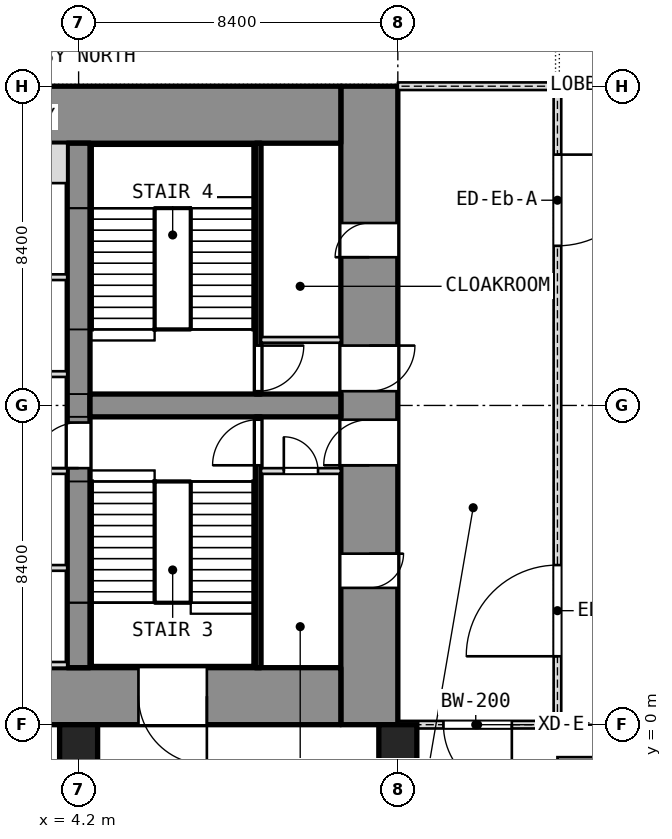
"""IFC4 building model, lengths in metres.
Left out: names, types, materials, properties, quantities, classifications, styles, units other than length and angle.
Written with IfcOpenShell. Run it as: python <this file> out.ifc"""

import sys

from ifc_helpers import new_model, si_unit, direction, frame, frame_2d, origin, origin_2d, place, context, subcontext, project, spatial, rectangle, extrude, element, fill, save


model = new_model("IFC4")
c1 = context("Model", 3, precision=1e-05, world=origin(), true_north=direction((0.0, 1.0)))
c2 = subcontext(c1, "Body", "Model", "MODEL_VIEW")
j1 = project(units=[si_unit("LENGTHUNIT", "METRE"), si_unit("PLANEANGLEUNIT", "RADIAN")], contexts=[c1])
p1 = place(None, origin())
s1 = spatial("IfcSite", under=j1, at=p1, CompositionType="ELEMENT")
p2 = place(p1, origin())
s2 = spatial("IfcBuilding", under=s1, at=p2, CompositionType="ELEMENT")
p3 = place(p2, origin())
s3 = spatial("IfcBuildingStorey", under=s2, at=p3, CompositionType="ELEMENT", Elevation=0.0)
p4 = place(p3, frame((11.85, 0.0, -0.3), z_axis=(0.0, 0.0, 1.0), x_axis=(0.0, 1.0, 0.0)))
e1 = element("IfcWall", 1, at=p4, inside=s3, PredefinedType="SHEAR", context=c2, shape_type="SweptSolid", body=[
    extrude(rectangle(XDim=16.8, YDim=1.5, at=frame_2d((8.4, 0.0))), origin(), (0.0, 0.0, 1.0), 8.3),
])
p5 = place(p4, frame((3.6, 0.0, 0.3)))
e2 = element("IfcOpeningElement", 2, at=p5, cuts=e1, PredefinedType="OPENING", context=c2, shape_type="SweptSolid", body=[
    extrude(rectangle(XDim=0.9, YDim=2.1, at=frame_2d((0.45, 1.05))), frame((0.0, 0.75, 0.0), z_axis=(0.0, -1.0, 0.0), x_axis=(1.0, 0.0, 0.0)), (0.0, 0.0, 1.0), 1.5),
])
p6 = place(p4, frame((6.825, 0.0, 0.3)))
e3 = element("IfcOpeningElement", 3, at=p6, cuts=e1, PredefinedType="OPENING", context=c2, shape_type="SweptSolid", body=[
    extrude(rectangle(XDim=1.2, YDim=2.1, at=frame_2d((0.6, 1.05))), frame((0.0, 0.75, 0.0), z_axis=(0.0, -1.0, 0.0), x_axis=(1.0, 0.0, 0.0)), (0.0, 0.0, 1.0), 1.5),
])
p7 = place(p4, frame((12.3, 0.0, 0.3)))
e4 = element("IfcOpeningElement", 4, at=p7, cuts=e1, PredefinedType="OPENING", context=c2, shape_type="SweptSolid", body=[
    extrude(rectangle(XDim=0.9, YDim=2.1, at=frame_2d((0.45, 1.05))), frame((0.0, 0.75, 0.0), z_axis=(0.0, -1.0, 0.0), x_axis=(1.0, 0.0, 0.0)), (0.0, 0.0, 1.0), 1.5),
])
p8 = place(p4, frame((8.775, 0.0, 0.3)))
e5 = element("IfcOpeningElement", 5, at=p8, cuts=e1, PredefinedType="OPENING", context=c2, shape_type="SweptSolid", body=[
    extrude(rectangle(XDim=1.2, YDim=2.1, at=frame_2d((0.6, 1.05))), frame((0.0, 0.75, 0.0), z_axis=(0.0, -1.0, 0.0), x_axis=(1.0, 0.0, 0.0)), (0.0, 0.0, 1.0), 1.5),
])
p9 = place(p3, frame((-11.1, 0.75, -0.3), z_axis=(0.0, 0.0, 1.0), x_axis=(1.0, 0.0, 0.0)))
e6 = element("IfcWall", 6, at=p9, inside=s3, PredefinedType="SHEAR", context=c2, shape_type="SweptSolid", body=[
    extrude(rectangle(XDim=22.2, YDim=1.5, at=frame_2d((11.1, 0.0))), origin(), (0.0, 0.0, 1.0), 8.3),
])
p10 = place(p9, frame((3.525, 0.0, 0.3)))
e7 = element("IfcOpeningElement", 7, at=p10, cuts=e6, PredefinedType="OPENING", context=c2, shape_type="SweptSolid", body=[
    extrude(rectangle(XDim=1.8, YDim=2.1, at=frame_2d((0.9, 1.05))), frame((0.0, 0.75, 0.0), z_axis=(0.0, -1.0, 0.0), x_axis=(1.0, 0.0, 0.0)), (0.0, 0.0, 1.0), 1.5),
])
p11 = place(p9, frame((16.875, 0.0, 0.3)))
e8 = element("IfcOpeningElement", 8, at=p11, cuts=e6, PredefinedType="OPENING", context=c2, shape_type="SweptSolid", body=[
    extrude(rectangle(XDim=1.8, YDim=2.1, at=frame_2d((0.9, 1.05))), frame((0.0, 0.75, 0.0), z_axis=(0.0, -1.0, 0.0), x_axis=(1.0, 0.0, 0.0)), (0.0, 0.0, 1.0), 1.5),
])
p12 = place(p3, frame((-11.1, 16.05, -0.3), z_axis=(0.0, 0.0, 1.0), x_axis=(1.0, 0.0, 0.0)))
e9 = element("IfcWall", 9, at=p12, inside=s3, PredefinedType="SHEAR", context=c2, shape_type="SweptSolid", body=[
    extrude(rectangle(XDim=22.2, YDim=1.5, at=frame_2d((11.1, 0.0))), origin(), (0.0, 0.0, 1.0), 8.3),
])
p13 = place(p3, frame((4.2, 1.5, -0.3), z_axis=(0.0, 0.0, 1.0), x_axis=(0.0, 1.0, 0.0)))
e10 = element("IfcWall", 10, at=p13, inside=s3, PredefinedType="SHEAR", context=c2, shape_type="SweptSolid", body=[
    extrude(rectangle(XDim=13.8, YDim=0.6, at=frame_2d((6.9, 0.0))), origin(), (0.0, 0.0, 1.0), 8.3),
])
p14 = place(p13, frame((5.25, 0.0, 0.3)))
e11 = element("IfcOpeningElement", 11, at=p14, cuts=e10, PredefinedType="OPENING", context=c2, shape_type="SweptSolid", body=[
    extrude(rectangle(XDim=1.2, YDim=2.1, at=frame_2d((0.6, 1.05))), frame((0.0, 0.3, 0.0), z_axis=(0.0, -1.0, 0.0), x_axis=(1.0, 0.0, 0.0)), (0.0, 0.0, 1.0), 0.6),
])
p15 = place(p3, frame((4.5, 8.4, -0.3), z_axis=(0.0, 0.0, 1.0), x_axis=(1.0, 0.0, 0.0)))
e12 = element("IfcWall", 12, at=p15, inside=s3, PredefinedType="SHEAR", context=c2, shape_type="SweptSolid", body=[
    extrude(rectangle(XDim=6.6, YDim=0.6, at=frame_2d((3.3, 0.0))), origin(), (0.0, 0.0, 1.0), 8.3),
])
for number, where, z_axis, x_axis in (
    (13, (4.2, -0.5, -0.3), (0.0, 0.0, 1.0), (1.0, 0.0, 0.0)),
    (14, (12.6, -0.5, -0.3), (0.0, 0.0, 1.0), (1.0, 0.0, 0.0)),
):
    element("IfcColumn", number, at=place(p3, frame(where, z_axis=z_axis, x_axis=x_axis)), inside=s3, PredefinedType="COLUMN", context=c2, shape_type="SweptSolid", body=[
        extrude(rectangle(XDim=1.0, YDim=1.0, at=origin_2d()), origin(), (0.0, 0.0, 1.0), 8.3),
    ])
p16 = place(p3, frame((8.925, 1.5, 0.0), z_axis=(0.0, 0.0, 1.0), x_axis=(0.0, 1.0, 0.0)))
e15 = element("IfcWall", 15, at=p16, inside=s3, PredefinedType="SHEAR", context=c2, shape_type="SweptSolid", body=[
    extrude(rectangle(XDim=6.6, YDim=0.15, at=frame_2d((3.3, 0.0))), origin(), (0.0, 0.0, 1.0), 7.78),
])
p17 = place(p16, frame((5.325, 0.0, 0.0)))
e16 = element("IfcOpeningElement", 16, at=p17, cuts=e15, PredefinedType="OPENING", context=c2, shape_type="SweptSolid", body=[
    extrude(rectangle(XDim=1.2, YDim=2.1, at=frame_2d((0.6, 1.05))), frame((0.0, 0.075, 0.0), z_axis=(0.0, -1.0, 0.0), x_axis=(1.0, 0.0, 0.0)), (0.0, 0.0, 1.0), 0.15),
])
p18 = place(p3, frame((9.0, 6.675, 0.0), z_axis=(0.0, 0.0, 1.0), x_axis=(1.0, 0.0, 0.0)))
e17 = element("IfcWall", 17, at=p18, inside=s3, PredefinedType="PARTITIONING", context=c2, shape_type="SweptSolid", body=[
    extrude(rectangle(XDim=2.1, YDim=0.15, at=frame_2d((1.05, 0.0))), origin(), (0.0, 0.0, 1.0), 7.78),
])
p19 = place(p18, frame((0.6, 0.0, 0.0)))
e18 = element("IfcOpeningElement", 18, at=p19, cuts=e17, PredefinedType="OPENING", context=c2, shape_type="SweptSolid", body=[
    extrude(rectangle(XDim=0.9, YDim=2.1, at=frame_2d((0.45, 1.05))), frame((0.0, 0.075, 0.0), z_axis=(0.0, -1.0, 0.0), x_axis=(1.0, 0.0, 0.0)), (0.0, 0.0, 1.0), 0.15),
])
p20 = place(p3, frame((8.925, 8.7, 0.0), z_axis=(0.0, 0.0, 1.0), x_axis=(0.0, 1.0, 0.0)))
e19 = element("IfcWall", 19, at=p20, inside=s3, PredefinedType="SHEAR", context=c2, shape_type="SweptSolid", body=[
    extrude(rectangle(XDim=6.6, YDim=0.15, at=frame_2d((3.3, 0.0))), origin(), (0.0, 0.0, 1.0), 7.78),
])
p21 = place(p20, frame((0.075, 0.0, 0.0)))
e20 = element("IfcOpeningElement", 20, at=p21, cuts=e19, PredefinedType="OPENING", context=c2, shape_type="SweptSolid", body=[
    extrude(rectangle(XDim=1.2, YDim=2.1, at=frame_2d((0.6, 1.05))), frame((0.0, 0.075, 0.0), z_axis=(0.0, -1.0, 0.0), x_axis=(1.0, 0.0, 0.0)), (0.0, 0.0, 1.0), 0.15),
])
p22 = place(p3, frame((9.0, 10.125, 0.0), z_axis=(0.0, 0.0, 1.0), x_axis=(1.0, 0.0, 0.0)))
e21 = element("IfcWall", 21, at=p22, inside=s3, PredefinedType="PARTITIONING", context=c2, shape_type="SweptSolid", body=[
    extrude(rectangle(XDim=2.1, YDim=0.15, at=frame_2d((1.05, 0.0))), origin(), (0.0, 0.0, 1.0), 7.78),
])
p23 = place(p3, frame((-3.9, 4.125, 0.0), z_axis=(0.0, 0.0, 1.0), x_axis=(1.0, 0.0, 0.0)))
e22 = element("IfcWall", 22, at=p23, inside=s3, PredefinedType="PARTITIONING", context=c2, shape_type="SweptSolid", body=[
    extrude(rectangle(XDim=7.8, YDim=0.15, at=frame_2d((3.9, 0.0))), origin(), (0.0, 0.0, 1.0), 7.78),
])
p24 = place(p23, frame((3.75, 0.0, 0.0)))
e23 = element("IfcOpeningElement", 23, at=p24, cuts=e22, PredefinedType="OPENING", context=c2, shape_type="SweptSolid", body=[
    extrude(rectangle(XDim=1.2, YDim=2.1, at=frame_2d((0.6, 1.05))), frame((0.0, 0.075, 0.0), z_axis=(0.0, -1.0, 0.0), x_axis=(1.0, 0.0, 0.0)), (0.0, 0.0, 1.0), 0.15),
])
p25 = place(p3, frame((-3.9, 11.775, 0.0), z_axis=(0.0, 0.0, 1.0), x_axis=(1.0, 0.0, 0.0)))
e24 = element("IfcWall", 24, at=p25, inside=s3, PredefinedType="PARTITIONING", context=c2, shape_type="SweptSolid", body=[
    extrude(rectangle(XDim=7.8, YDim=0.15, at=frame_2d((3.9, 0.0))), origin(), (0.0, 0.0, 1.0), 7.78),
])
p26 = place(p25, frame((3.3, 0.0, 0.0)))
e25 = element("IfcOpeningElement", 25, at=p26, cuts=e24, PredefinedType="OPENING", context=c2, shape_type="SweptSolid", body=[
    extrude(rectangle(XDim=1.2, YDim=2.1, at=frame_2d((0.6, 1.05))), frame((0.0, 0.075, 0.0), z_axis=(0.0, -1.0, 0.0), x_axis=(1.0, 0.0, 0.0)), (0.0, 0.0, 1.0), 0.15),
])
p27 = place(p3, frame((1.65, 1.575, -0.3), z_axis=(0.0, 0.0, 1.0), x_axis=(1.0, 0.0, 0.0)))
e26 = element("IfcWall", 26, at=p27, inside=s3, PredefinedType="SHEAR", context=c2, shape_type="SweptSolid", body=[
    extrude(rectangle(XDim=2.25, YDim=0.15, at=frame_2d((1.125, 0.0))), origin(), (0.0, 0.0, 1.0), 8.3),
])
p28 = place(p3, frame((1.65, 14.775, -0.3), z_axis=(0.0, 0.0, 1.0), x_axis=(1.0, 0.0, 0.0)))
e27 = element("IfcWall", 27, at=p28, inside=s3, PredefinedType="SHEAR", context=c2, shape_type="SweptSolid", body=[
    extrude(rectangle(XDim=2.25, YDim=1.05, at=frame_2d((1.125, 0.0))), origin(), (0.0, 0.0, 1.0), 8.3),
])
for number, where, z_axis, x_axis in (
    (28, (1.65, 6.675, -0.3), (0.0, 0.0, 1.0), (1.0, 0.0, 0.0)),
    (29, (1.65, 9.225, -0.3), (0.0, 0.0, 1.0), (1.0, 0.0, 0.0)),
):
    element("IfcWall", number, at=place(p3, frame(where, z_axis=z_axis, x_axis=x_axis)), inside=s3, PredefinedType="SHEAR", context=c2, shape_type="SweptSolid", body=[
        extrude(rectangle(XDim=2.25, YDim=0.15, at=frame_2d((1.125, 0.0))), origin(), (0.0, 0.0, 1.0), 8.3),
    ])
p29 = place(p3, frame((16.8, -0.1, 0.0), z_axis=(0.0, 0.0, 1.0), x_axis=(0.0, 1.0, 0.0)))
e30 = element("IfcWall", 30, at=p29, inside=s3, PredefinedType="PARTITIONING", context=c2, shape_type="SweptSolid", body=[
    extrude(rectangle(XDim=17.0, YDim=0.2, at=frame_2d((8.5, 0.0))), origin(), (0.0, 0.0, 1.0), 7.78),
])
p30 = place(p29, frame((1.9, 0.0, 0.0)))
e31 = element("IfcOpeningElement", 31, at=p30, cuts=e30, PredefinedType="OPENING", context=c2, shape_type="SweptSolid", body=[
    extrude(rectangle(XDim=2.4, YDim=2.1, at=frame_2d((1.2, 1.05))), frame((0.0, 0.1, 0.0), z_axis=(0.0, -1.0, 0.0), x_axis=(1.0, 0.0, 0.0)), (0.0, 0.0, 1.0), 0.2),
])
p31 = place(p29, frame((12.7, 0.0, 0.0)))
e32 = element("IfcOpeningElement", 32, at=p31, cuts=e30, PredefinedType="OPENING", context=c2, shape_type="SweptSolid", body=[
    extrude(rectangle(XDim=2.4, YDim=2.1, at=frame_2d((1.2, 1.05))), frame((0.0, 0.1, 0.0), z_axis=(0.0, -1.0, 0.0), x_axis=(1.0, 0.0, 0.0)), (0.0, 0.0, 1.0), 0.2),
])
p32 = place(p3, frame((12.6, 0.0, 0.0), z_axis=(0.0, 0.0, 1.0), x_axis=(1.0, 0.0, 0.0)))
e33 = element("IfcWall", 33, at=p32, inside=s3, PredefinedType="PARTITIONING", context=c2, shape_type="SweptSolid", body=[
    extrude(rectangle(XDim=4.1, YDim=0.2, at=frame_2d((2.05, 0.0))), origin(), (0.0, 0.0, 1.0), 7.78),
])
p33 = place(p32, frame((1.2, 0.0, 0.0)))
e34 = element("IfcOpeningElement", 34, at=p33, cuts=e33, PredefinedType="OPENING", context=c2, shape_type="SweptSolid", body=[
    extrude(rectangle(XDim=1.8, YDim=2.1, at=frame_2d((0.9, 1.05))), frame((0.0, 0.1, 0.0), z_axis=(0.0, -1.0, 0.0), x_axis=(1.0, 0.0, 0.0)), (0.0, 0.0, 1.0), 0.2),
])
p34 = place(p3, frame((12.6, 16.8, 0.0), z_axis=(0.0, 0.0, 1.0), x_axis=(1.0, 0.0, 0.0)))
e35 = element("IfcWall", 35, at=p34, inside=s3, PredefinedType="PARTITIONING", context=c2, shape_type="SweptSolid", body=[
    extrude(rectangle(XDim=4.1, YDim=0.2, at=frame_2d((2.05, 0.0))), origin(), (0.0, 0.0, 1.0), 7.78),
])
p35 = place(p5, origin())
e36 = element("IfcDoor", 36, at=p35, inside=s3, OperationType="SINGLE_SWING_LEFT", PredefinedType="DOOR", context=c2, shape_type="SweptSolid", body=[
    extrude(rectangle(XDim=0.9, YDim=2.1, at=frame_2d((0.45, 1.05))), frame((0.0, 0.025, 0.0), z_axis=(0.0, -1.0, 0.0), x_axis=(1.0, 0.0, 0.0)), (0.0, 0.0, 1.0), 0.05),
])
fill(e2, e36)
p36 = place(p6, origin())
e37 = element("IfcDoor", 37, at=p36, inside=s3, OperationType="SINGLE_SWING_LEFT", PredefinedType="DOOR", context=c2, shape_type="SweptSolid", body=[
    extrude(rectangle(XDim=1.2, YDim=2.1, at=frame_2d((0.6, 1.05))), frame((0.0, 0.025, 0.0), z_axis=(0.0, -1.0, 0.0), x_axis=(1.0, 0.0, 0.0)), (0.0, 0.0, 1.0), 0.05),
])
fill(e3, e37)
p37 = place(p17, origin())
e38 = element("IfcDoor", 38, at=p37, inside=s3, OperationType="SINGLE_SWING_LEFT", PredefinedType="DOOR", context=c2, shape_type="SweptSolid", body=[
    extrude(rectangle(XDim=1.2, YDim=2.1, at=frame_2d((0.6, 1.05))), frame((0.0, 0.025, 0.0), z_axis=(0.0, -1.0, 0.0), x_axis=(1.0, 0.0, 0.0)), (0.0, 0.0, 1.0), 0.05),
])
fill(e16, e38)
p38 = place(p19, origin())
e39 = element("IfcDoor", 39, at=p38, inside=s3, OperationType="SINGLE_SWING_LEFT", PredefinedType="DOOR", context=c2, shape_type="SweptSolid", body=[
    extrude(rectangle(XDim=0.9, YDim=2.1, at=frame_2d((0.45, 1.05))), frame((0.0, 0.025, 0.0), z_axis=(0.0, -1.0, 0.0), x_axis=(1.0, 0.0, 0.0)), (0.0, 0.0, 1.0), 0.05),
])
fill(e18, e39)
p39 = place(p7, origin())
e40 = element("IfcDoor", 40, at=p39, inside=s3, OperationType="SINGLE_SWING_LEFT", PredefinedType="DOOR", context=c2, shape_type="SweptSolid", body=[
    extrude(rectangle(XDim=0.9, YDim=2.1, at=frame_2d((0.45, 1.05))), frame((0.0, 0.025, 0.0), z_axis=(0.0, -1.0, 0.0), x_axis=(1.0, 0.0, 0.0)), (0.0, 0.0, 1.0), 0.05),
])
fill(e4, e40)
p40 = place(p8, origin())
e41 = element("IfcDoor", 41, at=p40, inside=s3, OperationType="SINGLE_SWING_LEFT", PredefinedType="DOOR", context=c2, shape_type="SweptSolid", body=[
    extrude(rectangle(XDim=1.2, YDim=2.1, at=frame_2d((0.6, 1.05))), frame((0.0, 0.025, 0.0), z_axis=(0.0, -1.0, 0.0), x_axis=(1.0, 0.0, 0.0)), (0.0, 0.0, 1.0), 0.05),
])
fill(e5, e41)
p41 = place(p21, origin())
e42 = element("IfcDoor", 42, at=p41, inside=s3, OperationType="SINGLE_SWING_LEFT", PredefinedType="DOOR", context=c2, shape_type="SweptSolid", body=[
    extrude(rectangle(XDim=1.2, YDim=2.1, at=frame_2d((0.6, 1.05))), frame((0.0, 0.025, 0.0), z_axis=(0.0, -1.0, 0.0), x_axis=(1.0, 0.0, 0.0)), (0.0, 0.0, 1.0), 0.05),
])
fill(e20, e42)
p42 = place(p14, origin())
e43 = element("IfcDoor", 43, at=p42, inside=s3, OperationType="SINGLE_SWING_LEFT", PredefinedType="DOOR", context=c2, shape_type="SweptSolid", body=[
    extrude(rectangle(XDim=1.2, YDim=2.1, at=frame_2d((0.6, 1.05))), frame((0.0, 0.025, 0.0), z_axis=(0.0, -1.0, 0.0), x_axis=(1.0, 0.0, 0.0)), (0.0, 0.0, 1.0), 0.05),
])
fill(e11, e43)
p43 = place(p30, origin())
e44 = element("IfcDoor", 44, at=p43, inside=s3, OperationType="DOUBLE_DOOR_SINGLE_SWING", PredefinedType="DOOR", context=c2, shape_type="SweptSolid", body=[
    extrude(rectangle(XDim=2.4, YDim=2.1, at=frame_2d((1.2, 1.05))), frame((0.0, 0.025, 0.0), z_axis=(0.0, -1.0, 0.0), x_axis=(1.0, 0.0, 0.0)), (0.0, 0.0, 1.0), 0.05),
])
fill(e31, e44)
p44 = place(p31, origin())
e45 = element("IfcDoor", 45, at=p44, inside=s3, OperationType="DOUBLE_DOOR_SINGLE_SWING", PredefinedType="DOOR", context=c2, shape_type="SweptSolid", body=[
    extrude(rectangle(XDim=2.4, YDim=2.1, at=frame_2d((1.2, 1.05))), frame((0.0, 0.025, 0.0), z_axis=(0.0, -1.0, 0.0), x_axis=(1.0, 0.0, 0.0)), (0.0, 0.0, 1.0), 0.05),
])
fill(e32, e45)
p45 = place(p33, frame((1.8, 0.0, 0.0), z_axis=(0.0, 0.0, 1.0), x_axis=(-1.0, 0.0, 0.0)))
e46 = element("IfcDoor", 46, at=p45, inside=s3, OperationType="DOUBLE_DOOR_SINGLE_SWING", PredefinedType="DOOR", context=c2, shape_type="SweptSolid", body=[
    extrude(rectangle(XDim=1.8, YDim=2.1, at=frame_2d((0.9, 1.05))), frame((0.0, 0.025, 0.0), z_axis=(0.0, -1.0, 0.0), x_axis=(1.0, 0.0, 0.0)), (0.0, 0.0, 1.0), 0.05),
])
fill(e34, e46)
p46 = place(p11, frame((1.8, 0.0, 0.0), z_axis=(0.0, 0.0, 1.0), x_axis=(-1.0, 0.0, 0.0)))
e47 = element("IfcDoor", 47, at=p46, inside=s3, OperationType="DOUBLE_DOOR_SINGLE_SWING", PredefinedType="DOOR", context=c2, shape_type="SweptSolid", body=[
    extrude(rectangle(XDim=1.8, YDim=2.1, at=frame_2d((0.9, 1.05))), frame((0.0, 0.025, 0.0), z_axis=(0.0, -1.0, 0.0), x_axis=(1.0, 0.0, 0.0)), (0.0, 0.0, 1.0), 0.05),
])
fill(e8, e47)
save(model, sys.argv[1])
